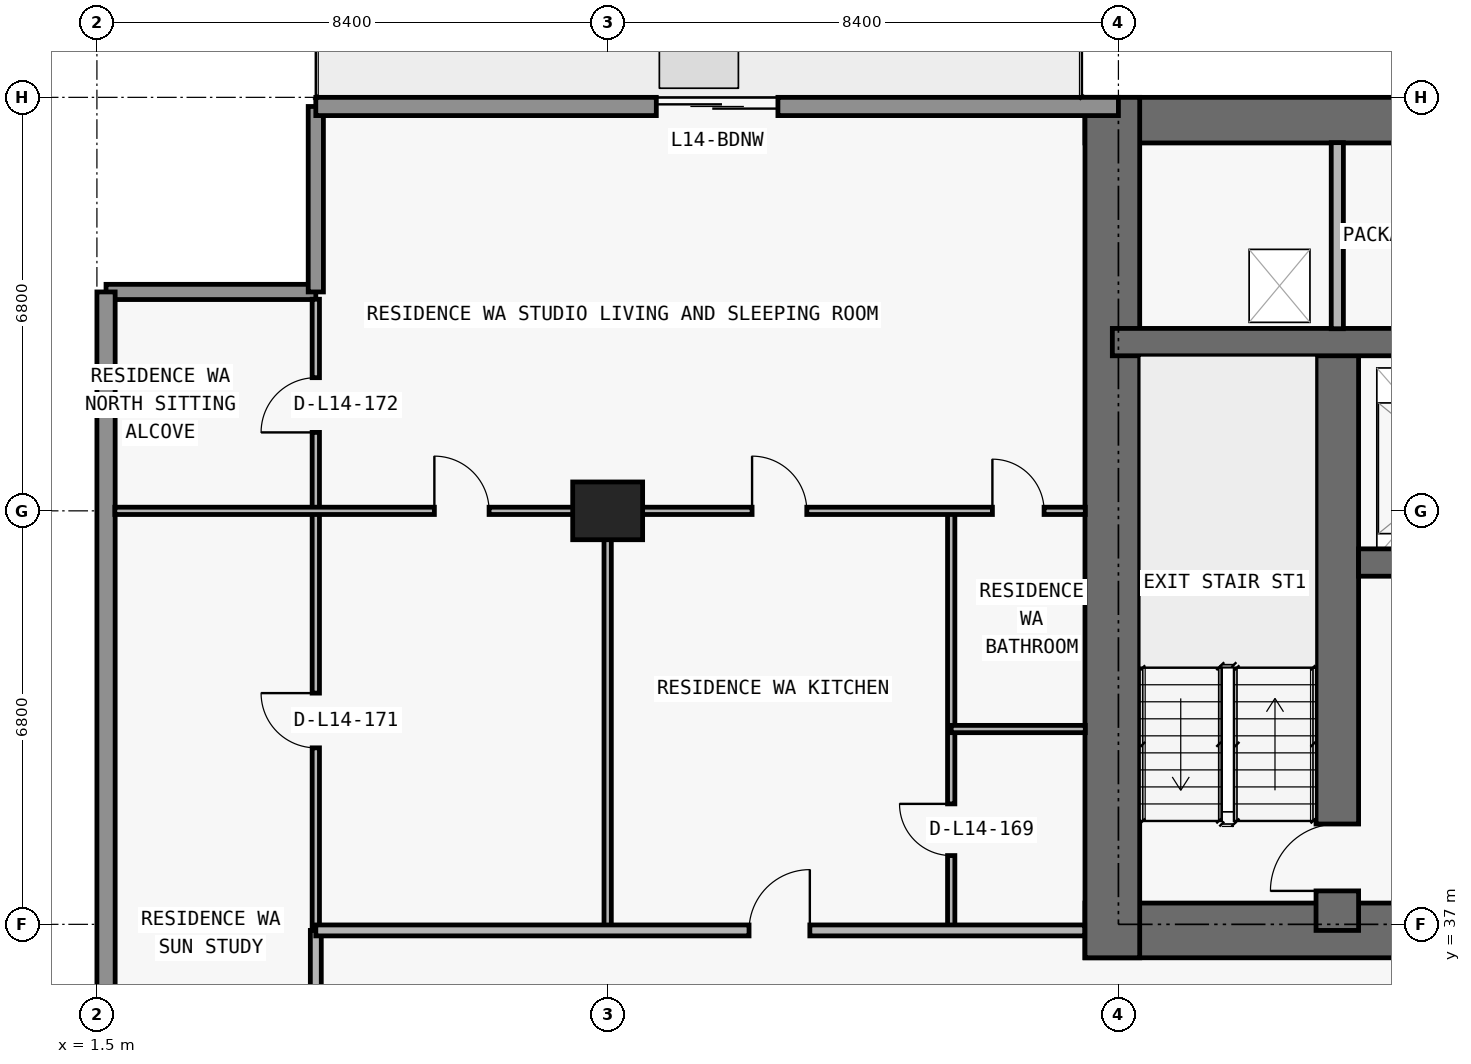
"""IFC4 building model, lengths in metres.
Left out: names, types, materials, properties, quantities, classifications, styles, units other than length and angle.
Written with IfcOpenShell. Run it as: python <this file> out.ifc"""

import sys

from ifc_helpers import new_model, si_unit, direction, frame, frame_2d, origin, origin_2d, place, context, subcontext, project, spatial, rectangle, extrude, element, fill, save


model = new_model("IFC4")
c1 = context("Model", 3, precision=1e-05, world=origin(), true_north=direction((0.0, 1.0)))
c2 = subcontext(c1, "Body", "Model", "MODEL_VIEW")
j1 = project(units=[si_unit("LENGTHUNIT", "METRE"), si_unit("PLANEANGLEUNIT", "RADIAN")], contexts=[c1])
p1 = place(None, origin())
s1 = spatial("IfcSite", under=j1, at=p1, CompositionType="ELEMENT")
p2 = place(p1, origin())
s2 = spatial("IfcBuilding", under=s1, at=p2, CompositionType="ELEMENT")
p3 = place(p2, frame((0.0, 0.0, 56.4)))
s3 = spatial("IfcBuildingStorey", under=s2, at=p3, CompositionType="ELEMENT", Elevation=56.4)
p4 = place(p3, frame((9.9, 43.8, 0.0), z_axis=(0.0, 0.0, 1.0), x_axis=(1.0, 0.0, 0.0)))
e1 = element("IfcColumn", 1, at=p4, inside=s3, PredefinedType="COLUMN", context=c2, shape_type="SweptSolid", body=[
    extrude(rectangle(XDim=1.15, YDim=0.95, at=origin_2d()), origin(), (0.0, 0.0, 1.0), 3.05),
])
p5 = place(p3, frame((17.75, 36.9, 0.0), z_axis=(0.0, 0.0, 1.0), x_axis=(1.0, 0.0, 0.0)))
e2 = element("IfcWall", 2, at=p5, inside=s3, PredefinedType="SHEAR", context=c2, shape_type="SweptSolid", body=[
    extrude(rectangle(XDim=42.3, YDim=0.9, at=frame_2d((21.15, 0.0))), origin(), (0.0, 0.0, 1.0), 3.05),
])
p6 = place(p5, frame((14.55, 0.0, 0.0)))
e3 = element("IfcOpeningElement", 3, at=p6, cuts=e2, PredefinedType="OPENING", context=c2, shape_type="SweptSolid", body=[
    extrude(rectangle(XDim=1.1, YDim=2.15, at=frame_2d((0.55, 1.075))), frame((0.0, 0.46, 0.0), z_axis=(0.0, -1.0, 0.0), x_axis=(1.0, 0.0, 0.0)), (0.0, 0.0, 1.0), 0.92),
])
p7 = place(p5, frame((6.4, 0.0, 0.0)))
e4 = element("IfcOpeningElement", 4, at=p7, cuts=e2, PredefinedType="OPENING", context=c2, shape_type="SweptSolid", body=[
    extrude(rectangle(XDim=1.05, YDim=2.15, at=frame_2d((0.525, 1.075))), frame((0.0, 0.46, 0.0), z_axis=(0.0, -1.0, 0.0), x_axis=(1.0, 0.0, 0.0)), (0.0, 0.0, 1.0), 0.92),
])
p8 = place(p5, frame((34.9, 0.0, 0.0)))
e5 = element("IfcOpeningElement", 5, at=p8, cuts=e2, PredefinedType="OPENING", context=c2, shape_type="SweptSolid", body=[
    extrude(rectangle(XDim=1.05, YDim=2.15, at=frame_2d((0.525, 1.075))), frame((0.0, 0.46, 0.0), z_axis=(0.0, -1.0, 0.0), x_axis=(1.0, 0.0, 0.0)), (0.0, 0.0, 1.0), 0.92),
])
p9 = place(p5, frame((11.012, 0.0, 0.0)))
e6 = element("IfcOpeningElement", 6, at=p9, cuts=e2, PredefinedType="OPENING", context=c2, shape_type="SweptSolid", body=[
    extrude(rectangle(XDim=1.05, YDim=2.15, at=frame_2d((0.525, 1.075))), frame((0.0, 0.46, 0.0), z_axis=(0.0, -1.0, 0.0), x_axis=(1.0, 0.0, 0.0)), (0.0, 0.0, 1.0), 0.92),
])
p10 = place(p5, frame((24.25, 0.0, 0.0)))
e7 = element("IfcOpeningElement", 7, at=p10, cuts=e2, PredefinedType="OPENING", context=c2, shape_type="SweptSolid", body=[
    extrude(rectangle(XDim=1.05, YDim=2.15, at=frame_2d((0.525, 1.075))), frame((0.0, 0.46, 0.0), z_axis=(0.0, -1.0, 0.0), x_axis=(1.0, 0.0, 0.0)), (0.0, 0.0, 1.0), 0.92),
])
p11 = place(p3, frame((17.75, 50.225, 0.0), z_axis=(0.0, 0.0, 1.0), x_axis=(1.0, 0.0, 0.0)))
e8 = element("IfcWall", 8, at=p11, inside=s3, PredefinedType="SHEAR", context=c2, shape_type="SweptSolid", body=[
    extrude(rectangle(XDim=42.3, YDim=0.75, at=frame_2d((21.15, 0.0))), origin(), (0.0, 0.0, 1.0), 3.05),
])
p12 = place(p3, frame((18.2, 36.45, 0.0), z_axis=(0.0, 0.0, 1.0), x_axis=(0.0, 1.0, 0.0)))
e9 = element("IfcWall", 9, at=p12, inside=s3, PredefinedType="SHEAR", context=c2, shape_type="SweptSolid", body=[
    extrude(rectangle(XDim=14.15, YDim=0.9, at=frame_2d((7.075, 0.0))), origin(), (0.0, 0.0, 1.0), 3.05),
])
p13 = place(p3, frame((21.9, 36.9, 0.0), z_axis=(0.0, 0.0, 1.0), x_axis=(0.0, 1.0, 0.0)))
e10 = element("IfcWall", 10, at=p13, inside=s3, PredefinedType="SHEAR", context=c2, shape_type="SweptSolid", body=[
    extrude(rectangle(XDim=9.675, YDim=0.7, at=frame_2d((4.837, 0.0))), origin(), (0.0, 0.0, 1.0), 3.05),
])
p14 = place(p13, frame((0.65, 0.0, 0.0)))
e11 = element("IfcOpeningElement", 11, at=p14, cuts=e10, PredefinedType="OPENING", context=c2, shape_type="SweptSolid", body=[
    extrude(rectangle(XDim=1.1, YDim=2.15, at=frame_2d((0.55, 1.075))), frame((0.0, 0.36, 0.0), z_axis=(0.0, -1.0, 0.0), x_axis=(1.0, 0.0, 0.0)), (0.0, 0.0, 1.0), 0.72),
])
p15 = place(p3, frame((22.25, 42.95, 0.0), z_axis=(0.0, 0.0, 1.0), x_axis=(1.0, 0.0, 0.0)))
e12 = element("IfcWall", 12, at=p15, inside=s3, PredefinedType="SHEAR", context=c2, shape_type="SweptSolid", body=[
    extrude(rectangle(XDim=33.3, YDim=0.45, at=frame_2d((16.65, 0.0))), origin(), (0.0, 0.0, 1.0), 3.05),
])
p16 = place(p15, frame((1.05, 0.0, 0.0)))
e13 = element("IfcOpeningElement", 13, at=p16, cuts=e12, PredefinedType="OPENING", context=c2, shape_type="SweptSolid", body=[
    extrude(rectangle(XDim=1.2, YDim=2.2, at=frame_2d((0.6, 1.1))), frame((0.0, 0.235, 0.0), z_axis=(0.0, -1.0, 0.0), x_axis=(1.0, 0.0, 0.0)), (0.0, 0.0, 1.0), 0.47),
])
p17 = place(p15, frame((31.05, 0.0, 0.0)))
e14 = element("IfcOpeningElement", 14, at=p17, cuts=e12, PredefinedType="OPENING", context=c2, shape_type="SweptSolid", body=[
    extrude(rectangle(XDim=1.2, YDim=2.2, at=frame_2d((0.6, 1.1))), frame((0.0, 0.235, 0.0), z_axis=(0.0, -1.0, 0.0), x_axis=(1.0, 0.0, 0.0)), (0.0, 0.0, 1.0), 0.47),
])
p18 = place(p15, frame((13.5, 0.0, 0.0)))
e15 = element("IfcOpeningElement", 15, at=p18, cuts=e12, PredefinedType="OPENING", context=c2, shape_type="SweptSolid", body=[
    extrude(rectangle(XDim=1.1, YDim=2.2, at=frame_2d((0.55, 1.1))), frame((0.0, 0.235, 0.0), z_axis=(0.0, -1.0, 0.0), x_axis=(1.0, 0.0, 0.0)), (0.0, 0.0, 1.0), 0.47),
])
p19 = place(p15, frame((16.1, 0.0, 0.0)))
e16 = element("IfcOpeningElement", 16, at=p19, cuts=e12, PredefinedType="OPENING", context=c2, shape_type="SweptSolid", body=[
    extrude(rectangle(XDim=1.1, YDim=2.2, at=frame_2d((0.55, 1.1))), frame((0.0, 0.235, 0.0), z_axis=(0.0, -1.0, 0.0), x_axis=(1.0, 0.0, 0.0)), (0.0, 0.0, 1.0), 0.47),
])
p20 = place(p15, frame((18.7, 0.0, 0.0)))
e17 = element("IfcOpeningElement", 17, at=p20, cuts=e12, PredefinedType="OPENING", context=c2, shape_type="SweptSolid", body=[
    extrude(rectangle(XDim=1.1, YDim=2.2, at=frame_2d((0.55, 1.1))), frame((0.0, 0.235, 0.0), z_axis=(0.0, -1.0, 0.0), x_axis=(1.0, 0.0, 0.0)), (0.0, 0.0, 1.0), 0.47),
])
p21 = place(p15, frame((3.625, 0.0, 0.0)))
e18 = element("IfcOpeningElement", 18, at=p21, cuts=e12, PredefinedType="OPENING", context=c2, shape_type="SweptSolid", body=[
    extrude(rectangle(XDim=1.05, YDim=2.15, at=frame_2d((0.525, 1.075))), frame((0.0, 0.235, 0.0), z_axis=(0.0, -1.0, 0.0), x_axis=(1.0, 0.0, 0.0)), (0.0, 0.0, 1.0), 0.47),
])
p22 = place(p15, frame((28.675, 0.0, 0.0)))
e19 = element("IfcOpeningElement", 19, at=p22, cuts=e12, PredefinedType="OPENING", context=c2, shape_type="SweptSolid", body=[
    extrude(rectangle(XDim=1.05, YDim=2.15, at=frame_2d((0.525, 1.075))), frame((0.0, 0.235, 0.0), z_axis=(0.0, -1.0, 0.0), x_axis=(1.0, 0.0, 0.0)), (0.0, 0.0, 1.0), 0.47),
])
p23 = place(p3, frame((18.2, 46.575, 0.0), z_axis=(0.0, 0.0, 1.0), x_axis=(1.0, 0.0, 0.0)))
e20 = element("IfcWall", 20, at=p23, inside=s3, PredefinedType="SHEAR", context=c2, shape_type="SweptSolid", body=[
    extrude(rectangle(XDim=41.4, YDim=0.45, at=frame_2d((20.7, 0.0))), origin(), (0.0, 0.0, 1.0), 3.05),
])
p24 = place(p23, frame((7.7, 0.0, 0.0)))
e21 = element("IfcOpeningElement", 21, at=p24, cuts=e20, PredefinedType="OPENING", context=c2, shape_type="SweptSolid", body=[
    extrude(rectangle(XDim=1.0, YDim=2.2, at=frame_2d((0.5, 1.1))), frame((0.0, 0.235, 0.0), z_axis=(0.0, -1.0, 0.0), x_axis=(1.0, 0.0, 0.0)), (0.0, 0.0, 1.0), 0.47),
])
p25 = place(p23, frame((32.725, 0.0, 0.0)))
e22 = element("IfcOpeningElement", 22, at=p25, cuts=e20, PredefinedType="OPENING", context=c2, shape_type="SweptSolid", body=[
    extrude(rectangle(XDim=1.05, YDim=2.15, at=frame_2d((0.525, 1.075))), frame((0.0, 0.235, 0.0), z_axis=(0.0, -1.0, 0.0), x_axis=(1.0, 0.0, 0.0)), (0.0, 0.0, 1.0), 0.47),
])
p26 = place(p3, frame((1.65, 47.4, 0.0), z_axis=(0.0, 0.0, 1.0), x_axis=(1.0, 0.0, 0.0)))
e23 = element("IfcWall", 23, at=p26, inside=s3, PredefinedType="ELEMENTEDWALL", context=c2, shape_type="SweptSolid", body=[
    extrude(rectangle(XDim=3.45, YDim=0.25, at=frame_2d((1.725, 0.0))), origin(), (0.0, 0.0, 1.0), 3.05),
])
p27 = place(p3, frame((5.1, 47.4, 0.0), z_axis=(0.0, 0.0, 1.0), x_axis=(0.0, 1.0, 0.0)))
e24 = element("IfcWall", 24, at=p27, inside=s3, PredefinedType="ELEMENTEDWALL", context=c2, shape_type="SweptSolid", body=[
    extrude(rectangle(XDim=3.05, YDim=0.25, at=frame_2d((1.525, 0.0))), origin(), (0.0, 0.0, 1.0), 3.05),
])
p28 = place(p3, frame((1.65, 26.8, 0.0), z_axis=(0.0, 0.0, 1.0), x_axis=(0.0, 1.0, 0.0)))
e25 = element("IfcWall", 25, at=p28, inside=s3, PredefinedType="STANDARD", context=c2, shape_type="SweptSolid", body=[
    extrude(rectangle(XDim=20.6, YDim=0.3, at=frame_2d((10.3, 0.0))), origin(), (0.0, 0.0, 1.0), 3.05),
])
p29 = place(p3, frame((5.1, 50.45, 0.0), z_axis=(0.0, 0.0, 1.0), x_axis=(1.0, 0.0, 0.0)))
e26 = element("IfcWall", 26, at=p29, inside=s3, PredefinedType="STANDARD", context=c2, shape_type="SweptSolid", body=[
    extrude(rectangle(XDim=13.2, YDim=0.3, at=frame_2d((6.6, 0.0))), origin(), (0.0, 0.0, 1.0), 3.05),
])
p30 = place(p29, frame((5.6, 0.0, 0.0)))
e27 = element("IfcOpeningElement", 27, at=p30, cuts=e26, PredefinedType="OPENING", context=c2, shape_type="SweptSolid", body=[
    extrude(rectangle(XDim=2.0, YDim=2.3, at=frame_2d((1.0, 1.15))), frame((0.0, 0.16, 0.0), z_axis=(0.0, -1.0, 0.0), x_axis=(1.0, 0.0, 0.0)), (0.0, 0.0, 1.0), 0.32),
])
p31 = place(p3, frame((5.1, 33.805, 0.0), z_axis=(0.0, 0.0, 1.0), x_axis=(0.0, 1.0, 0.0)))
e28 = element("IfcWall", 28, at=p31, inside=s3, PredefinedType="PARTITIONING", context=c2, shape_type="SweptSolid", body=[
    extrude(rectangle(XDim=3.095, YDim=0.18, at=frame_2d((1.547, 0.0))), origin(), (0.0, 0.0, 1.0), 3.05),
])
p32 = place(p3, frame((5.1, 36.905, 0.0), z_axis=(0.0, 0.0, 1.0), x_axis=(0.0, 1.0, 0.0)))
e29 = element("IfcWall", 29, at=p32, inside=s3, PredefinedType="PARTITIONING", context=c2, shape_type="SweptSolid", body=[
    extrude(rectangle(XDim=10.375, YDim=0.12, at=frame_2d((5.188, 0.0))), origin(), (0.0, 0.0, 1.0), 3.05),
])
p33 = place(p32, frame((2.998, 0.0, 0.0)))
e30 = element("IfcOpeningElement", 30, at=p33, cuts=e29, PredefinedType="OPENING", context=c2, shape_type="SweptSolid", body=[
    extrude(rectangle(XDim=0.9, YDim=2.15, at=frame_2d((0.45, 1.075))), frame((0.0, 0.07, 0.0), z_axis=(0.0, -1.0, 0.0), x_axis=(1.0, 0.0, 0.0)), (0.0, 0.0, 1.0), 0.14),
])
p34 = place(p32, frame((8.185, 0.0, 0.0)))
e31 = element("IfcOpeningElement", 31, at=p34, cuts=e29, PredefinedType="OPENING", context=c2, shape_type="SweptSolid", body=[
    extrude(rectangle(XDim=0.9, YDim=2.15, at=frame_2d((0.45, 1.075))), frame((0.0, 0.07, 0.0), z_axis=(0.0, -1.0, 0.0), x_axis=(1.0, 0.0, 0.0)), (0.0, 0.0, 1.0), 0.14),
])
p35 = place(p3, frame((9.9, 36.9, 0.0), z_axis=(0.0, 0.0, 1.0), x_axis=(0.0, 1.0, 0.0)))
e32 = element("IfcWall", 32, at=p35, inside=s3, PredefinedType="PARTITIONING", context=c2, shape_type="SweptSolid", body=[
    extrude(rectangle(XDim=6.9, YDim=0.12, at=frame_2d((3.45, 0.0))), origin(), (0.0, 0.0, 1.0), 2.11),
])
p36 = place(p3, frame((15.55, 36.9, 0.0), z_axis=(0.0, 0.0, 1.0), x_axis=(0.0, 1.0, 0.0)))
e33 = element("IfcWall", 33, at=p36, inside=s3, PredefinedType="PARTITIONING", context=c2, shape_type="SweptSolid", body=[
    extrude(rectangle(XDim=6.9, YDim=0.12, at=frame_2d((3.45, 0.0))), origin(), (0.0, 0.0, 1.0), 3.05),
])
p37 = place(p36, frame((1.231, 0.0, 0.0)))
e34 = element("IfcOpeningElement", 34, at=p37, cuts=e33, PredefinedType="OPENING", context=c2, shape_type="SweptSolid", body=[
    extrude(rectangle(XDim=0.85, YDim=2.1, at=frame_2d((0.425, 1.05))), frame((0.0, 0.07, 0.0), z_axis=(0.0, -1.0, 0.0), x_axis=(1.0, 0.0, 0.0)), (0.0, 0.0, 1.0), 0.14),
])
p38 = place(p3, frame((21.9, 46.795, 0.0), z_axis=(0.0, 0.0, 1.0), x_axis=(0.0, 1.0, 0.0)))
e35 = element("IfcWall", 35, at=p38, inside=s3, PredefinedType="PARTITIONING", context=c2, shape_type="SweptSolid", body=[
    extrude(rectangle(XDim=3.06, YDim=0.2, at=frame_2d((1.53, 0.0))), origin(), (0.0, 0.0, 1.0), 3.05),
])
p39 = place(p3, frame((5.1, 36.9, 0.0), z_axis=(0.0, 0.0, 1.0), x_axis=(1.0, 0.0, 0.0)))
e36 = element("IfcWall", 36, at=p39, inside=s3, PredefinedType="PARTITIONING", context=c2, shape_type="SweptSolid", body=[
    extrude(rectangle(XDim=12.645, YDim=0.18, at=frame_2d((6.323, 0.0))), origin(), (0.0, 0.0, 1.0), 3.05),
])
p40 = place(p39, frame((7.125, 0.0, 0.0)))
e37 = element("IfcOpeningElement", 37, at=p40, cuts=e36, PredefinedType="OPENING", context=c2, shape_type="SweptSolid", body=[
    extrude(rectangle(XDim=1.0, YDim=2.2, at=frame_2d((0.5, 1.1))), frame((0.0, 0.1, 0.0), z_axis=(0.0, -1.0, 0.0), x_axis=(1.0, 0.0, 0.0)), (0.0, 0.0, 1.0), 0.2),
])
p41 = place(p3, frame((15.55, 40.212, 0.0), z_axis=(0.0, 0.0, 1.0), x_axis=(1.0, 0.0, 0.0)))
e38 = element("IfcWall", 38, at=p41, inside=s3, PredefinedType="PARTITIONING", context=c2, shape_type="SweptSolid", body=[
    extrude(rectangle(XDim=2.205, YDim=0.12, at=frame_2d((1.103, 0.0))), origin(), (0.0, 0.0, 1.0), 3.05),
])
p42 = place(p3, frame((1.795, 43.8, 0.0), z_axis=(0.0, 0.0, 1.0), x_axis=(1.0, 0.0, 0.0)))
e39 = element("IfcWall", 39, at=p42, inside=s3, PredefinedType="PARTITIONING", context=c2, shape_type="SweptSolid", body=[
    extrude(rectangle(XDim=15.96, YDim=0.12, at=frame_2d((7.98, 0.0))), origin(), (0.0, 0.0, 1.0), 2.339),
])
p43 = place(p42, frame((5.255, 0.0, 0.0)))
e40 = element("IfcOpeningElement", 40, at=p43, cuts=e39, PredefinedType="OPENING", context=c2, shape_type="SweptSolid", body=[
    extrude(rectangle(XDim=0.9, YDim=2.15, at=frame_2d((0.45, 1.075))), frame((0.0, 0.07, 0.0), z_axis=(0.0, -1.0, 0.0), x_axis=(1.0, 0.0, 0.0)), (0.0, 0.0, 1.0), 0.14),
])
p44 = place(p42, frame((10.48, 0.0, 0.0)))
e41 = element("IfcOpeningElement", 41, at=p44, cuts=e39, PredefinedType="OPENING", context=c2, shape_type="SweptSolid", body=[
    extrude(rectangle(XDim=0.9, YDim=2.15, at=frame_2d((0.45, 1.075))), frame((0.0, 0.07, 0.0), z_axis=(0.0, -1.0, 0.0), x_axis=(1.0, 0.0, 0.0)), (0.0, 0.0, 1.0), 0.14),
])
p45 = place(p42, frame((14.433, 0.0, 0.0)))
e42 = element("IfcOpeningElement", 42, at=p45, cuts=e39, PredefinedType="OPENING", context=c2, shape_type="SweptSolid", body=[
    extrude(rectangle(XDim=0.85, YDim=2.1, at=frame_2d((0.425, 1.05))), frame((0.0, 0.07, 0.0), z_axis=(0.0, -1.0, 0.0), x_axis=(1.0, 0.0, 0.0)), (0.0, 0.0, 1.0), 0.14),
])
p46 = place(p30, origin())
e43 = element("IfcDoor", 43, at=p46, inside=s3, OperationType="DOUBLE_DOOR_SLIDING", PredefinedType="DOOR", context=c2, shape_type="SweptSolid", body=[
    extrude(rectangle(XDim=2.0, YDim=2.3, at=frame_2d((1.0, 1.15))), frame((0.0, 0.025, 0.0), z_axis=(0.0, -1.0, 0.0), x_axis=(1.0, 0.0, 0.0)), (0.0, 0.0, 1.0), 0.05),
])
fill(e27, e43)
p47 = place(p14, origin())
e44 = element("IfcDoor", 44, at=p47, inside=s3, OperationType="SINGLE_SWING_LEFT", PredefinedType="DOOR", context=c2, shape_type="SweptSolid", body=[
    extrude(rectangle(XDim=1.1, YDim=2.15, at=frame_2d((0.55, 1.075))), frame((0.0, 0.025, 0.0), z_axis=(0.0, -1.0, 0.0), x_axis=(1.0, 0.0, 0.0)), (0.0, 0.0, 1.0), 0.05),
])
fill(e11, e44)
p48 = place(p43, origin())
e45 = element("IfcDoor", 45, at=p48, inside=s3, OperationType="SINGLE_SWING_LEFT", PredefinedType="DOOR", context=c2, shape_type="SweptSolid", body=[
    extrude(rectangle(XDim=0.9, YDim=2.15, at=frame_2d((0.45, 1.075))), frame((0.0, 0.025, 0.0), z_axis=(0.0, -1.0, 0.0), x_axis=(1.0, 0.0, 0.0)), (0.0, 0.0, 1.0), 0.05),
])
fill(e40, e45)
p49 = place(p40, origin())
e46 = element("IfcDoor", 46, at=p49, inside=s3, OperationType="SINGLE_SWING_RIGHT", PredefinedType="DOOR", context=c2, shape_type="SweptSolid", body=[
    extrude(rectangle(XDim=1.0, YDim=2.2, at=frame_2d((0.5, 1.1))), frame((0.0, 0.025, 0.0), z_axis=(0.0, -1.0, 0.0), x_axis=(1.0, 0.0, 0.0)), (0.0, 0.0, 1.0), 0.05),
])
fill(e37, e46)
p50 = place(p44, origin())
e47 = element("IfcDoor", 47, at=p50, inside=s3, OperationType="SINGLE_SWING_LEFT", PredefinedType="DOOR", context=c2, shape_type="SweptSolid", body=[
    extrude(rectangle(XDim=0.9, YDim=2.15, at=frame_2d((0.45, 1.075))), frame((0.0, 0.025, 0.0), z_axis=(0.0, -1.0, 0.0), x_axis=(1.0, 0.0, 0.0)), (0.0, 0.0, 1.0), 0.05),
])
fill(e41, e47)
p51 = place(p37, origin())
e48 = element("IfcDoor", 48, at=p51, inside=s3, OperationType="SINGLE_SWING_RIGHT", PredefinedType="DOOR", context=c2, shape_type="SweptSolid", body=[
    extrude(rectangle(XDim=0.85, YDim=2.1, at=frame_2d((0.425, 1.05))), frame((0.0, 0.025, 0.0), z_axis=(0.0, -1.0, 0.0), x_axis=(1.0, 0.0, 0.0)), (0.0, 0.0, 1.0), 0.05),
])
fill(e34, e48)
p52 = place(p45, origin())
e49 = element("IfcDoor", 49, at=p52, inside=s3, OperationType="SINGLE_SWING_LEFT", PredefinedType="DOOR", context=c2, shape_type="SweptSolid", body=[
    extrude(rectangle(XDim=0.85, YDim=2.1, at=frame_2d((0.425, 1.05))), frame((0.0, 0.025, 0.0), z_axis=(0.0, -1.0, 0.0), x_axis=(1.0, 0.0, 0.0)), (0.0, 0.0, 1.0), 0.05),
])
fill(e42, e49)
p53 = place(p33, origin())
e50 = element("IfcDoor", 50, at=p53, inside=s3, OperationType="SINGLE_SWING_RIGHT", PredefinedType="DOOR", context=c2, shape_type="SweptSolid", body=[
    extrude(rectangle(XDim=0.9, YDim=2.15, at=frame_2d((0.45, 1.075))), frame((0.0, 0.025, 0.0), z_axis=(0.0, -1.0, 0.0), x_axis=(1.0, 0.0, 0.0)), (0.0, 0.0, 1.0), 0.05),
])
fill(e30, e50)
p54 = place(p34, origin())
e51 = element("IfcDoor", 51, at=p54, inside=s3, OperationType="SINGLE_SWING_LEFT", PredefinedType="DOOR", context=c2, shape_type="SweptSolid", body=[
    extrude(rectangle(XDim=0.9, YDim=2.15, at=frame_2d((0.45, 1.075))), frame((0.0, 0.025, 0.0), z_axis=(0.0, -1.0, 0.0), x_axis=(1.0, 0.0, 0.0)), (0.0, 0.0, 1.0), 0.05),
])
fill(e31, e51)
save(model, sys.argv[1])
